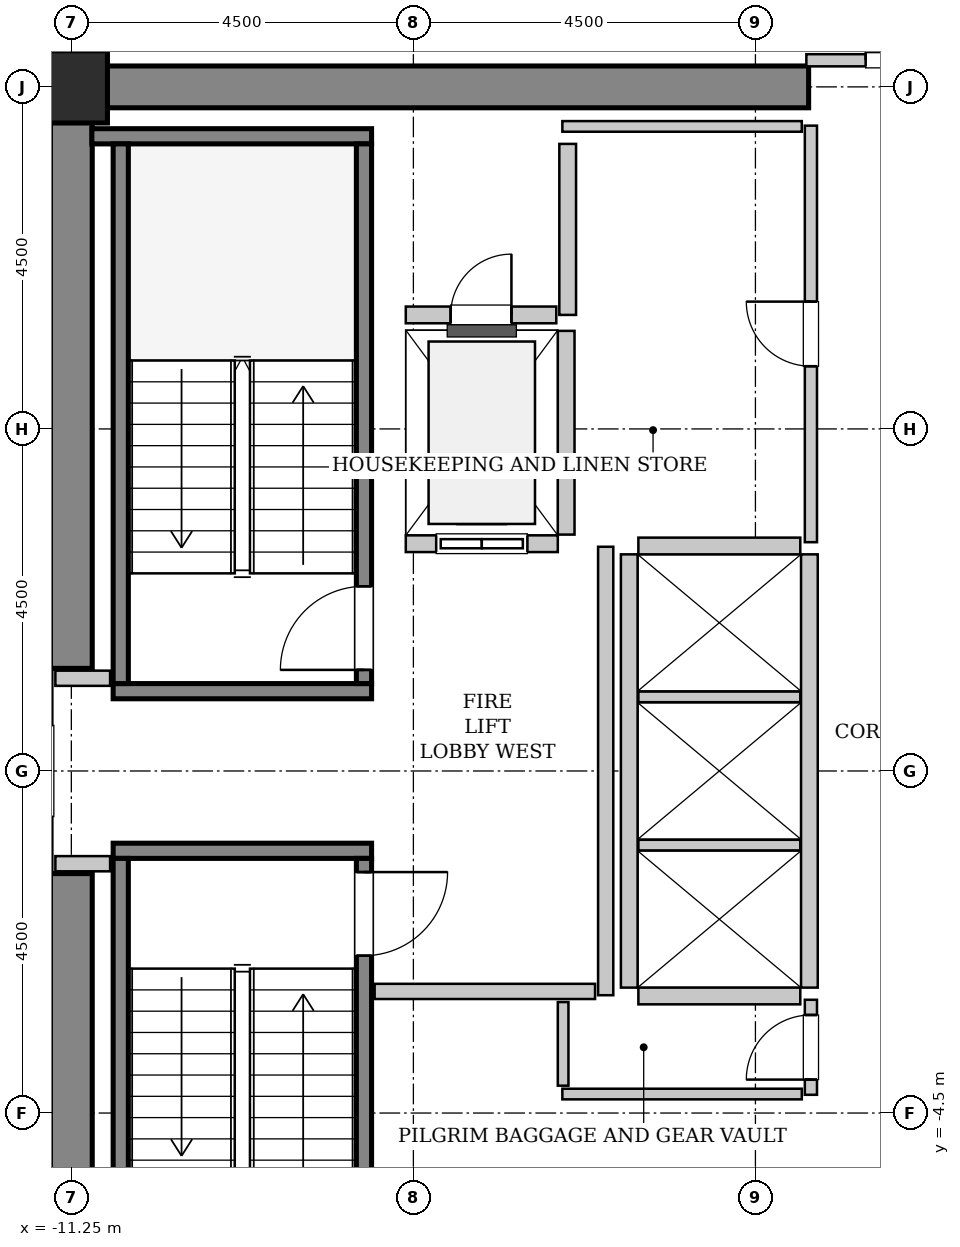
"""IFC4 building model, lengths in metres.
Left out: names, types, materials, properties, quantities, classifications, styles, units other than length and angle.
Written with IfcOpenShell. Run it as: python <this file> out.ifc"""

import sys

from ifc_helpers import new_model, si_unit, direction, frame, frame_2d, origin, origin_2d, place, context, subcontext, project, spatial, rectangle, hollow_rectangle, extrude, source, transform, mapped, element, fill, save


model = new_model("IFC4")
c1 = context("Model", 3, precision=1e-05, world=origin(), true_north=direction((0.0, 1.0)))
c2 = subcontext(c1, "Body", "Model", "MODEL_VIEW")
j1 = project(units=[si_unit("LENGTHUNIT", "METRE"), si_unit("PLANEANGLEUNIT", "RADIAN")], contexts=[c1])
p1 = place(None, origin())
s1 = spatial("IfcSite", under=j1, at=p1, CompositionType="ELEMENT")
p2 = place(p1, origin())
s2 = spatial("IfcBuilding", under=s1, at=p2, CompositionType="ELEMENT")
p3 = place(p2, frame((0.0, 0.0, 160.2)))
s3 = spatial("IfcBuildingStorey", under=s2, at=p3, CompositionType="ELEMENT", Elevation=160.2)
m1 = source(origin(), c2, "Body", "SweptSolid", [
    extrude(rectangle(XDim=9.975, YDim=0.55, at=frame_2d((4.987, 0.0))), origin(), (0.0, 0.0, 1.0), 3.8),
])
p4 = place(p3, frame((-11.525, 9.0, 0.0), z_axis=(0.0, 0.0, 1.0), x_axis=(1.0, 0.0, 0.0)))
e1 = element("IfcWall", 1, at=p4, inside=s3, PredefinedType="SHEAR", context=c2, shape_type="MappedRepresentation", body=[
    mapped(m1, transform((0.0, 0.0, 0.0), x_axis=(1.0, 0.0, 0.0), y_axis=(0.0, 1.0, 0.0), z_axis=(0.0, 0.0, 1.0), scale=1.0)),
])
m2 = source(origin(), c2, "Body", "SweptSolid", [
    extrude(rectangle(XDim=7.375, YDim=0.55, at=frame_2d((3.688, 0.0))), origin(), (0.0, 0.0, 1.0), 3.8),
])
for number, where, z_axis, x_axis in (
    (2, (-11.25, -8.725, 0.0), (0.0, 0.0, 1.0), (0.0, 1.0, 0.0)),
    (3, (-11.25, 1.35, 0.0), (0.0, 0.0, 1.0), (0.0, 1.0, 0.0)),
):
    element("IfcWall", number, at=place(p3, frame(where, z_axis=z_axis, x_axis=x_axis)), inside=s3, PredefinedType="SHEAR", context=c2, shape_type="MappedRepresentation", body=[
        mapped(m2, transform((0.0, 0.0, 0.0), x_axis=(1.0, 0.0, 0.0), y_axis=(0.0, 1.0, 0.0), z_axis=(0.0, 0.0, 1.0), scale=1.0)),
    ])
m3 = source(origin(), c2, "Body", "SweptSolid", [
    extrude(hollow_rectangle(XDim=0.95, YDim=0.95, WallThickness=0.045, InnerFilletRadius=0.045, OuterFilletRadius=0.09, at=origin_2d()), origin(), (0.0, 0.0, 1.0), 3.8),
])
p5 = place(p3, frame((-11.25, 9.0, 0.0), z_axis=(0.0, 0.0, 1.0), x_axis=(1.0, 0.0, 0.0)))
e4 = element("IfcColumn", 4, at=p5, inside=s3, PredefinedType="COLUMN", context=c2, shape_type="MappedRepresentation", body=[
    mapped(m3, transform((0.0, 0.0, 0.0), x_axis=(1.0, 0.0, 0.0), y_axis=(0.0, 1.0, 0.0), z_axis=(0.0, 0.0, 1.0), scale=1.0)),
])
m4 = source(origin(), c2, "Body", "SweptSolid", [
    extrude(rectangle(XDim=3.4, YDim=0.2, at=frame_2d((1.7, 0.0))), origin(), (0.0, 0.0, 1.0), 3.8),
])
p6 = place(p3, frame((-7.3, 1.05, 0.0), z_axis=(0.0, 0.0, 1.0), x_axis=(-1.0, 0.0, 0.0)))
e5 = element("IfcWall", 5, at=p6, inside=s3, PredefinedType="SOLIDWALL", context=c2, shape_type="MappedRepresentation", body=[
    mapped(m4, transform((0.0, 0.0, 0.0), x_axis=(1.0, 0.0, 0.0), y_axis=(0.0, 1.0, 0.0), z_axis=(0.0, 0.0, 1.0), scale=1.0)),
])
m5 = source(origin(), c2, "Body", "SweptSolid", [
    extrude(rectangle(XDim=3.68, YDim=0.2, at=frame_2d((1.84, 0.0))), origin(), (0.0, 0.0, 1.0), 3.8),
])
p7 = place(p3, frame((-7.3, 8.35, 0.0), z_axis=(0.0, 0.0, 1.0), x_axis=(-1.0, 0.0, 0.0)))
e6 = element("IfcWall", 6, at=p7, inside=s3, PredefinedType="SOLIDWALL", context=c2, shape_type="MappedRepresentation", body=[
    mapped(m5, transform((0.0, 0.0, 0.0), x_axis=(1.0, 0.0, 0.0), y_axis=(0.0, 1.0, 0.0), z_axis=(0.0, 0.0, 1.0), scale=1.0)),
])
m6 = source(origin(), c2, "Body", "SweptSolid", [
    extrude(rectangle(XDim=7.1, YDim=0.2, at=frame_2d((3.55, 0.0))), origin(), (0.0, 0.0, 1.0), 3.8),
])
p8 = place(p3, frame((-7.4, 1.15, 0.0), z_axis=(0.0, 0.0, 1.0), x_axis=(0.0, 1.0, 0.0)))
e7 = element("IfcWall", 7, at=p8, inside=s3, PredefinedType="SOLIDWALL", context=c2, shape_type="MappedRepresentation", body=[
    mapped(m6, transform((0.0, 0.0, 0.0), x_axis=(1.0, 0.0, 0.0), y_axis=(0.0, 1.0, 0.0), z_axis=(0.0, 0.0, 1.0), scale=1.0)),
])
p9 = place(p8, frame((0.18, 0.0, 0.0)))
e8 = element("IfcOpeningElement", 8, at=p9, cuts=e7, PredefinedType="OPENING", context=c2, shape_type="SweptSolid", body=[
    extrude(rectangle(XDim=1.1, YDim=2.15, at=frame_2d((0.55, 1.075))), frame((0.0, 0.11, 0.0), z_axis=(0.0, -1.0, 0.0), x_axis=(1.0, 0.0, 0.0)), (0.0, 0.0, 1.0), 0.22),
])
p10 = place(p3, frame((-10.6, 1.15, 0.0), z_axis=(0.0, 0.0, 1.0), x_axis=(0.0, 1.0, 0.0)))
e9 = element("IfcWall", 9, at=p10, inside=s3, PredefinedType="SOLIDWALL", context=c2, shape_type="MappedRepresentation", body=[
    mapped(m6, transform((0.0, 0.0, 0.0), x_axis=(1.0, 0.0, 0.0), y_axis=(0.0, 1.0, 0.0), z_axis=(0.0, 0.0, 1.0), scale=1.0)),
])
p11 = place(p3, frame((-10.7, -1.05, 0.0), z_axis=(0.0, 0.0, 1.0), x_axis=(1.0, 0.0, 0.0)))
e10 = element("IfcWall", 10, at=p11, inside=s3, PredefinedType="SOLIDWALL", context=c2, shape_type="MappedRepresentation", body=[
    mapped(m4, transform((0.0, 0.0, 0.0), x_axis=(1.0, 0.0, 0.0), y_axis=(0.0, 1.0, 0.0), z_axis=(0.0, 0.0, 1.0), scale=1.0)),
])
p12 = place(p3, frame((-10.6, -1.15, 0.0), z_axis=(0.0, 0.0, 1.0), x_axis=(0.0, -1.0, 0.0)))
e11 = element("IfcWall", 11, at=p12, inside=s3, PredefinedType="SOLIDWALL", context=c2, shape_type="MappedRepresentation", body=[
    mapped(m6, transform((0.0, 0.0, 0.0), x_axis=(1.0, 0.0, 0.0), y_axis=(0.0, 1.0, 0.0), z_axis=(0.0, 0.0, 1.0), scale=1.0)),
])
p13 = place(p3, frame((-7.4, -1.15, 0.0), z_axis=(0.0, 0.0, 1.0), x_axis=(0.0, -1.0, 0.0)))
e12 = element("IfcWall", 12, at=p13, inside=s3, PredefinedType="SOLIDWALL", context=c2, shape_type="MappedRepresentation", body=[
    mapped(m6, transform((0.0, 0.0, 0.0), x_axis=(1.0, 0.0, 0.0), y_axis=(0.0, 1.0, 0.0), z_axis=(0.0, 0.0, 1.0), scale=1.0)),
])
p14 = place(p13, frame((0.18, 0.0, 0.0)))
e13 = element("IfcOpeningElement", 13, at=p14, cuts=e12, PredefinedType="OPENING", context=c2, shape_type="SweptSolid", body=[
    extrude(rectangle(XDim=1.1, YDim=2.15, at=frame_2d((0.55, 1.075))), frame((0.0, 0.11, 0.0), z_axis=(0.0, -1.0, 0.0), x_axis=(1.0, 0.0, 0.0)), (0.0, 0.0, 1.0), 0.22),
])
m7 = source(origin(), c2, "Body", "SweptSolid", [
    extrude(rectangle(XDim=2.0, YDim=0.22, at=frame_2d((1.0, 0.0))), origin(), (0.0, 0.0, 1.0), 3.535),
])
p15 = place(p3, frame((-6.85, 2.99, 0.0), z_axis=(0.0, 0.0, 1.0), x_axis=(1.0, 0.0, 0.0)))
e14 = element("IfcWall", 14, at=p15, inside=s3, PredefinedType="SOLIDWALL", context=c2, shape_type="MappedRepresentation", body=[
    mapped(m7, transform((0.0, 0.0, 0.0), x_axis=(1.0, 0.0, 0.0), y_axis=(0.0, 1.0, 0.0), z_axis=(0.0, 0.0, 1.0), scale=1.0)),
])
p16 = place(p15, frame((0.4, 0.0, 0.0)))
e15 = element("IfcOpeningElement", 15, at=p16, cuts=e14, PredefinedType="OPENING", context=c2, shape_type="SweptSolid", body=[
    extrude(rectangle(XDim=1.2, YDim=2.2, at=frame_2d((0.6, 1.1))), frame((0.0, 0.12, 0.0), z_axis=(0.0, -1.0, 0.0), x_axis=(1.0, 0.0, 0.0)), (0.0, 0.0, 1.0), 0.24),
])
m8 = source(origin(), c2, "Body", "SweptSolid", [
    extrude(rectangle(XDim=2.68, YDim=0.22, at=frame_2d((1.34, 0.0))), origin(), (0.0, 0.0, 1.0), 3.535),
])
p17 = place(p3, frame((-4.74, 3.11, 0.0), z_axis=(0.0, 0.0, 1.0), x_axis=(0.0, 1.0, 0.0)))
e16 = element("IfcWall", 16, at=p17, inside=s3, PredefinedType="SOLIDWALL", context=c2, shape_type="MappedRepresentation", body=[
    mapped(m8, transform((0.0, 0.0, 0.0), x_axis=(1.0, 0.0, 0.0), y_axis=(0.0, 1.0, 0.0), z_axis=(0.0, 0.0, 1.0), scale=1.0)),
])
m9 = source(origin(), c2, "Body", "SweptSolid", [
    extrude(rectangle(XDim=5.7, YDim=0.22, at=frame_2d((2.85, 0.0))), origin(), (0.0, 0.0, 1.0), 3.535),
])
for number, where, z_axis, x_axis in (
    (17, (-1.54, -2.85, 0.0), (0.0, 0.0, 1.0), (0.0, 1.0, 0.0)),
    (18, (-3.91, 2.85, 0.0), (0.0, 0.0, 1.0), (0.0, -1.0, 0.0)),
):
    element("IfcWall", number, at=place(p3, frame(where, z_axis=z_axis, x_axis=x_axis)), inside=s3, PredefinedType="SOLIDWALL", context=c2, shape_type="MappedRepresentation", body=[
        mapped(m9, transform((0.0, 0.0, 0.0), x_axis=(1.0, 0.0, 0.0), y_axis=(0.0, 1.0, 0.0), z_axis=(0.0, 0.0, 1.0), scale=1.0)),
    ])
m10 = source(origin(), c2, "Body", "SweptSolid", [
    extrude(rectangle(XDim=2.13, YDim=0.22, at=frame_2d((1.065, 0.0))), origin(), (0.0, 0.0, 1.0), 3.535),
])
p18 = place(p3, frame((-3.79, -2.96, 0.0), z_axis=(0.0, 0.0, 1.0), x_axis=(1.0, 0.0, 0.0)))
e19 = element("IfcWall", 19, at=p18, inside=s3, PredefinedType="SOLIDWALL", context=c2, shape_type="MappedRepresentation", body=[
    mapped(m10, transform((0.0, 0.0, 0.0), x_axis=(1.0, 0.0, 0.0), y_axis=(0.0, 1.0, 0.0), z_axis=(0.0, 0.0, 1.0), scale=1.0)),
])
m11 = source(origin(), c2, "Body", "SweptSolid", [
    extrude(rectangle(XDim=2.13, YDim=0.14, at=frame_2d((1.065, 0.0))), origin(), (0.0, 0.0, 1.0), 3.535),
])
for number, where, z_axis, x_axis in (
    (20, (-3.79, -0.975, 0.0), (0.0, 0.0, 1.0), (1.0, 0.0, 0.0)),
    (21, (-3.79, 0.975, 0.0), (0.0, 0.0, 1.0), (1.0, 0.0, 0.0)),
):
    element("IfcWall", number, at=place(p3, frame(where, z_axis=z_axis, x_axis=x_axis)), inside=s3, PredefinedType="PARTITIONING", context=c2, shape_type="MappedRepresentation", body=[
        mapped(m11, transform((0.0, 0.0, 0.0), x_axis=(1.0, 0.0, 0.0), y_axis=(0.0, 1.0, 0.0), z_axis=(0.0, 0.0, 1.0), scale=1.0)),
    ])
p19 = place(p3, frame((-1.66, 2.96, 0.0), z_axis=(0.0, 0.0, 1.0), x_axis=(-1.0, 0.0, 0.0)))
e22 = element("IfcWall", 22, at=p19, inside=s3, PredefinedType="SOLIDWALL", context=c2, shape_type="MappedRepresentation", body=[
    mapped(m10, transform((0.0, 0.0, 0.0), x_axis=(1.0, 0.0, 0.0), y_axis=(0.0, 1.0, 0.0), z_axis=(0.0, 0.0, 1.0), scale=1.0)),
])
m12 = source(origin(), c2, "Body", "SweptSolid", [
    extrude(rectangle(XDim=2.25, YDim=0.22, at=frame_2d((1.125, 0.0))), origin(), (0.0, 0.0, 1.0), 3.535),
])
p20 = place(p3, frame((-4.72, 6.0, 0.0), z_axis=(0.0, 0.0, 1.0), x_axis=(0.0, 1.0, 0.0)))
e23 = element("IfcWall", 23, at=p20, inside=s3, PredefinedType="SOLIDWALL", context=c2, shape_type="MappedRepresentation", body=[
    mapped(m12, transform((0.0, 0.0, 0.0), x_axis=(1.0, 0.0, 0.0), y_axis=(0.0, 1.0, 0.0), z_axis=(0.0, 0.0, 1.0), scale=1.0)),
])
m13 = source(origin(), c2, "Body", "SweptSolid", [
    extrude(rectangle(XDim=1.98, YDim=0.22, at=frame_2d((0.99, 0.0))), origin(), (0.0, 0.0, 1.0), 3.535),
])
p21 = place(p3, frame((-6.85, 6.0, 0.0), z_axis=(0.0, 0.0, 1.0), x_axis=(1.0, 0.0, 0.0)))
e24 = element("IfcWall", 24, at=p21, inside=s3, PredefinedType="SOLIDWALL", context=c2, shape_type="MappedRepresentation", body=[
    mapped(m13, transform((0.0, 0.0, 0.0), x_axis=(1.0, 0.0, 0.0), y_axis=(0.0, 1.0, 0.0), z_axis=(0.0, 0.0, 1.0), scale=1.0)),
])
p22 = place(p21, frame((0.59, 0.0, 0.0)))
e25 = element("IfcOpeningElement", 25, at=p22, cuts=e24, PredefinedType="OPENING", context=c2, shape_type="SweptSolid", body=[
    extrude(rectangle(XDim=0.8, YDim=2.0, at=frame_2d((0.4, 1.0))), frame((0.0, 0.12, 0.0), z_axis=(0.0, -1.0, 0.0), x_axis=(1.0, 0.0, 0.0)), (0.0, 0.0, 1.0), 0.24),
])
m14 = source(origin(), c2, "Body", "SweptSolid", [
    extrude(rectangle(XDim=5.9, YDim=0.2, at=frame_2d((2.95, 0.0))), origin(), (0.0, 0.0, 1.0), 3.535),
])
p23 = place(p3, frame((-4.22, -2.95, 0.0), z_axis=(0.0, 0.0, 1.0), x_axis=(0.0, 1.0, 0.0)))
e26 = element("IfcWall", 26, at=p23, inside=s3, PredefinedType="PARTITIONING", context=c2, shape_type="MappedRepresentation", body=[
    mapped(m14, transform((0.0, 0.0, 0.0), x_axis=(1.0, 0.0, 0.0), y_axis=(0.0, 1.0, 0.0), z_axis=(0.0, 0.0, 1.0), scale=1.0)),
])
m15 = source(origin(), c2, "Body", "SweptSolid", [
    extrude(rectangle(XDim=2.9, YDim=0.2, at=frame_2d((1.45, 0.0))), origin(), (0.0, 0.0, 1.0), 3.535),
])
p24 = place(p3, frame((-7.26, -2.9, 0.0), z_axis=(0.0, 0.0, 1.0), x_axis=(1.0, 0.0, 0.0)))
e27 = element("IfcWall", 27, at=p24, inside=s3, PredefinedType="PARTITIONING", context=c2, shape_type="MappedRepresentation", body=[
    mapped(m15, transform((0.0, 0.0, 0.0), x_axis=(1.0, 0.0, 0.0), y_axis=(0.0, 1.0, 0.0), z_axis=(0.0, 0.0, 1.0), scale=1.0)),
])
m16 = source(origin(), c2, "Body", "SweptSolid", [
    extrude(rectangle(XDim=0.72, YDim=0.2, at=frame_2d((0.36, 0.0))), origin(), (0.0, 0.0, 1.0), 3.535),
])
for number, where, z_axis, x_axis in (
    (28, (-11.46, 1.22, 0.0), (0.0, 0.0, 1.0), (1.0, 0.0, 0.0)),
    (29, (-11.46, -1.22, 0.0), (0.0, 0.0, 1.0), (1.0, 0.0, 0.0)),
):
    element("IfcWall", number, at=place(p3, frame(where, z_axis=z_axis, x_axis=x_axis)), inside=s3, PredefinedType="PARTITIONING", context=c2, shape_type="MappedRepresentation", body=[
        mapped(m16, transform((0.0, 0.0, 0.0), x_axis=(1.0, 0.0, 0.0), y_axis=(0.0, 1.0, 0.0), z_axis=(0.0, 0.0, 1.0), scale=1.0)),
    ])
m17 = source(origin(), c2, "Body", "SweptSolid", [
    extrude(rectangle(XDim=3.16, YDim=0.16, at=frame_2d((1.58, 0.0))), origin(), (0.0, 0.0, 1.0), 2.425),
])
p25 = place(p3, frame((-1.58, 9.35, 0.0), z_axis=(0.0, 0.0, 1.0), x_axis=(1.0, 0.0, 0.0)))
e30 = element("IfcWall", 30, at=p25, inside=s3, PredefinedType="PARTITIONING", context=c2, shape_type="MappedRepresentation", body=[
    mapped(m17, transform((0.0, 0.0, 0.0), x_axis=(1.0, 0.0, 0.0), y_axis=(0.0, 1.0, 0.0), z_axis=(0.0, 0.0, 1.0), scale=1.0)),
])
p26 = place(p25, frame((0.78, 0.0, 0.0)))
e31 = element("IfcOpeningElement", 31, at=p26, cuts=e30, PredefinedType="OPENING", context=c2, shape_type="SweptSolid", body=[
    extrude(rectangle(XDim=1.6, YDim=2.3, at=frame_2d((0.8, 1.15))), frame((0.0, 0.09, 0.0), z_axis=(0.0, -1.0, 0.0), x_axis=(1.0, 0.0, 0.0)), (0.0, 0.0, 1.0), 0.18),
])
m18 = source(origin(), c2, "Body", "SweptSolid", [
    extrude(rectangle(XDim=5.48, YDim=0.16, at=frame_2d((2.74, 0.0))), origin(), (0.0, 0.0, 1.0), 3.535),
])
p27 = place(p3, frame((-1.52, 3.01, 0.0), z_axis=(0.0, 0.0, 1.0), x_axis=(0.0, 1.0, 0.0)))
e32 = element("IfcWall", 32, at=p27, inside=s3, PredefinedType="PARTITIONING", context=c2, shape_type="MappedRepresentation", body=[
    mapped(m18, transform((0.0, 0.0, 0.0), x_axis=(1.0, 0.0, 0.0), y_axis=(0.0, 1.0, 0.0), z_axis=(0.0, 0.0, 1.0), scale=1.0)),
])
p28 = place(p27, frame((2.315, 0.0, 0.0)))
e33 = element("IfcOpeningElement", 33, at=p28, cuts=e32, PredefinedType="OPENING", context=c2, shape_type="SweptSolid", body=[
    extrude(rectangle(XDim=0.85, YDim=2.1, at=frame_2d((0.425, 1.05))), frame((0.0, 0.09, 0.0), z_axis=(0.0, -1.0, 0.0), x_axis=(1.0, 0.0, 0.0)), (0.0, 0.0, 1.0), 0.18),
])
m19 = source(origin(), c2, "Body", "SweptSolid", [
    extrude(rectangle(XDim=3.15, YDim=0.14, at=frame_2d((1.575, 0.0))), origin(), (0.0, 0.0, 1.0), 3.535),
])
p29 = place(p3, frame((-4.79, 8.48, 0.0), z_axis=(0.0, 0.0, 1.0), x_axis=(1.0, 0.0, 0.0)))
e34 = element("IfcWall", 34, at=p29, inside=s3, PredefinedType="PARTITIONING", context=c2, shape_type="MappedRepresentation", body=[
    mapped(m19, transform((0.0, 0.0, 0.0), x_axis=(1.0, 0.0, 0.0), y_axis=(0.0, 1.0, 0.0), z_axis=(0.0, 0.0, 1.0), scale=1.0)),
])
m20 = source(origin(), c2, "Body", "SweptSolid", [
    extrude(rectangle(XDim=1.25, YDim=0.16, at=frame_2d((0.625, 0.0))), origin(), (0.0, 0.0, 1.0), 3.535),
])
p30 = place(p3, frame((-1.52, -4.26, 0.0), z_axis=(0.0, 0.0, 1.0), x_axis=(0.0, 1.0, 0.0)))
e35 = element("IfcWall", 35, at=p30, inside=s3, PredefinedType="PARTITIONING", context=c2, shape_type="MappedRepresentation", body=[
    mapped(m20, transform((0.0, 0.0, 0.0), x_axis=(1.0, 0.0, 0.0), y_axis=(0.0, 1.0, 0.0), z_axis=(0.0, 0.0, 1.0), scale=1.0)),
])
p31 = place(p30, frame((0.2, 0.0, 0.0)))
e36 = element("IfcOpeningElement", 36, at=p31, cuts=e35, PredefinedType="OPENING", context=c2, shape_type="SweptSolid", body=[
    extrude(rectangle(XDim=0.85, YDim=2.1, at=frame_2d((0.425, 1.05))), frame((0.0, 0.09, 0.0), z_axis=(0.0, -1.0, 0.0), x_axis=(1.0, 0.0, 0.0)), (0.0, 0.0, 1.0), 0.18),
])
p32 = place(p3, frame((-4.79, -4.25, 0.0), z_axis=(0.0, 0.0, 1.0), x_axis=(1.0, 0.0, 0.0)))
e37 = element("IfcWall", 37, at=p32, inside=s3, PredefinedType="PARTITIONING", context=c2, shape_type="MappedRepresentation", body=[
    mapped(m19, transform((0.0, 0.0, 0.0), x_axis=(1.0, 0.0, 0.0), y_axis=(0.0, 1.0, 0.0), z_axis=(0.0, 0.0, 1.0), scale=1.0)),
])
m21 = source(origin(), c2, "Body", "SweptSolid", [
    extrude(rectangle(XDim=1.1, YDim=0.14, at=frame_2d((0.55, 0.0))), origin(), (0.0, 0.0, 1.0), 3.535),
])
p33 = place(p3, frame((-4.78, -4.14, 0.0), z_axis=(0.0, 0.0, 1.0), x_axis=(0.0, 1.0, 0.0)))
e38 = element("IfcWall", 38, at=p33, inside=s3, PredefinedType="PARTITIONING", context=c2, shape_type="MappedRepresentation", body=[
    mapped(m21, transform((0.0, 0.0, 0.0), x_axis=(1.0, 0.0, 0.0), y_axis=(0.0, 1.0, 0.0), z_axis=(0.0, 0.0, 1.0), scale=1.0)),
])
m22 = source(origin(), c2, "Body", "SweptSolid", [
    extrude(rectangle(XDim=1.1, YDim=2.15, at=frame_2d((0.55, 1.075))), frame((0.0, 0.025, 0.0), z_axis=(0.0, -1.0, 0.0), x_axis=(1.0, 0.0, 0.0)), (0.0, 0.0, 1.0), 0.05),
])
p34 = place(p9, origin())
e39 = element("IfcDoor", 39, at=p34, inside=s3, OperationType="SINGLE_SWING_LEFT", PredefinedType="DOOR", context=c2, shape_type="MappedRepresentation", body=[
    mapped(m22, transform((0.0, 0.0, 0.0), x_axis=(1.0, 0.0, 0.0), y_axis=(0.0, 1.0, 0.0), z_axis=(0.0, 0.0, 1.0), scale=1.0)),
])
fill(e8, e39)
p35 = place(p14, origin())
e40 = element("IfcDoor", 40, at=p35, inside=s3, OperationType="SINGLE_SWING_LEFT", PredefinedType="DOOR", context=c2, shape_type="MappedRepresentation", body=[
    mapped(m22, transform((0.0, 0.0, 0.0), x_axis=(1.0, 0.0, 0.0), y_axis=(0.0, 1.0, 0.0), z_axis=(0.0, 0.0, 1.0), scale=1.0)),
])
fill(e13, e40)
m23 = source(origin(), c2, "Body", "SweptSolid", [
    extrude(rectangle(XDim=1.2, YDim=2.2, at=frame_2d((0.6, 1.1))), frame((0.0, 0.025, 0.0), z_axis=(0.0, -1.0, 0.0), x_axis=(1.0, 0.0, 0.0)), (0.0, 0.0, 1.0), 0.05),
])
p36 = place(p16, origin())
e41 = element("IfcDoor", 41, at=p36, inside=s3, OperationType="SLIDING_TO_LEFT", PredefinedType="DOOR", context=c2, shape_type="MappedRepresentation", body=[
    mapped(m23, transform((0.0, 0.0, 0.0), x_axis=(1.0, 0.0, 0.0), y_axis=(0.0, 1.0, 0.0), z_axis=(0.0, 0.0, 1.0), scale=1.0)),
])
fill(e15, e41)
m24 = source(origin(), c2, "Body", "SweptSolid", [
    extrude(rectangle(XDim=0.8, YDim=2.0, at=frame_2d((0.4, 1.0))), frame((0.0, 0.025, 0.0), z_axis=(0.0, -1.0, 0.0), x_axis=(1.0, 0.0, 0.0)), (0.0, 0.0, 1.0), 0.05),
])
p37 = place(p22, origin())
e42 = element("IfcDoor", 42, at=p37, inside=s3, OperationType="SINGLE_SWING_RIGHT", PredefinedType="TRAPDOOR", context=c2, shape_type="MappedRepresentation", body=[
    mapped(m24, transform((0.0, 0.0, 0.0), x_axis=(1.0, 0.0, 0.0), y_axis=(0.0, 1.0, 0.0), z_axis=(0.0, 0.0, 1.0), scale=1.0)),
])
fill(e25, e42)
m25 = source(origin(), c2, "Body", "SweptSolid", [
    extrude(rectangle(XDim=1.6, YDim=2.3, at=frame_2d((0.8, 1.15))), frame((0.0, 0.025, 0.0), z_axis=(0.0, -1.0, 0.0), x_axis=(1.0, 0.0, 0.0)), (0.0, 0.0, 1.0), 0.05),
])
p38 = place(p26, origin())
e43 = element("IfcDoor", 43, at=p38, inside=s3, OperationType="DOUBLE_DOOR_SINGLE_SWING", PredefinedType="DOOR", context=c2, shape_type="MappedRepresentation", body=[
    mapped(m25, transform((0.0, 0.0, 0.0), x_axis=(1.0, 0.0, 0.0), y_axis=(0.0, 1.0, 0.0), z_axis=(0.0, 0.0, 1.0), scale=1.0)),
])
fill(e31, e43)
m26 = source(origin(), c2, "Body", "SweptSolid", [
    extrude(rectangle(XDim=0.85, YDim=2.1, at=frame_2d((0.425, 1.05))), frame((0.0, 0.025, 0.0), z_axis=(0.0, -1.0, 0.0), x_axis=(1.0, 0.0, 0.0)), (0.0, 0.0, 1.0), 0.05),
])
p39 = place(p28, origin())
e44 = element("IfcDoor", 44, at=p39, inside=s3, OperationType="SINGLE_SWING_RIGHT", PredefinedType="DOOR", context=c2, shape_type="MappedRepresentation", body=[
    mapped(m26, transform((0.0, 0.0, 0.0), x_axis=(1.0, 0.0, 0.0), y_axis=(0.0, 1.0, 0.0), z_axis=(0.0, 0.0, 1.0), scale=1.0)),
])
fill(e33, e44)
p40 = place(p31, origin())
e45 = element("IfcDoor", 45, at=p40, inside=s3, OperationType="SINGLE_SWING_LEFT", PredefinedType="DOOR", context=c2, shape_type="MappedRepresentation", body=[
    mapped(m26, transform((0.0, 0.0, 0.0), x_axis=(1.0, 0.0, 0.0), y_axis=(0.0, 1.0, 0.0), z_axis=(0.0, 0.0, 1.0), scale=1.0)),
])
fill(e36, e45)
save(model, sys.argv[1])
